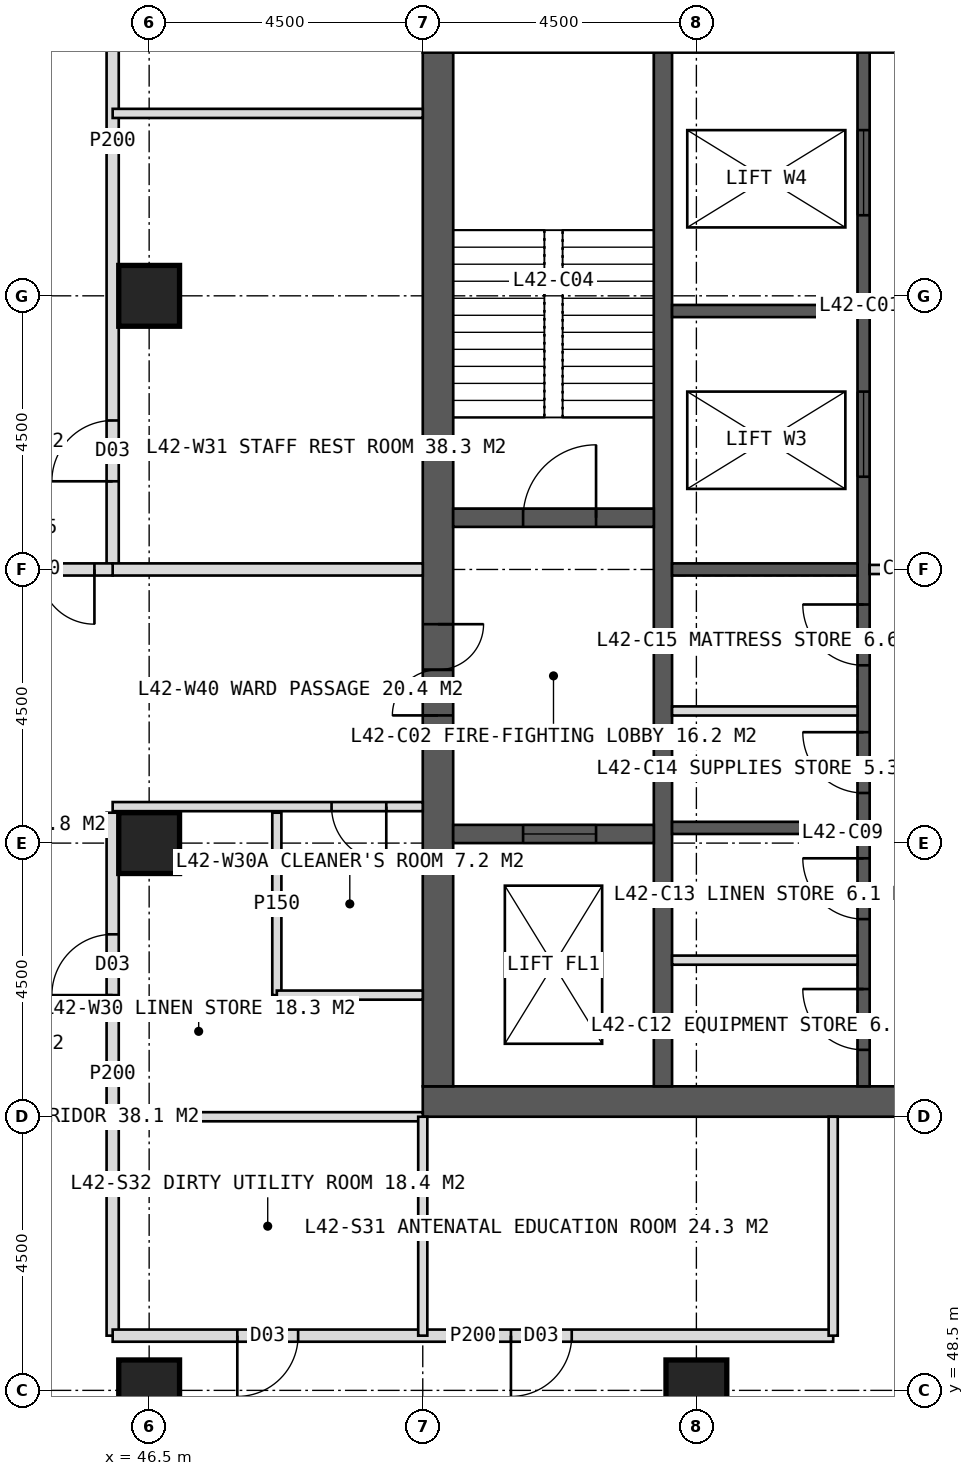
"""IFC4 building model, lengths in metres.
Left out: names, types, materials, properties, quantities, classifications, styles, units other than length and angle.
Written with IfcOpenShell. Run it as: python <this file> out.ifc"""

import sys

from ifc_helpers import new_model, si_unit, direction, frame, frame_2d, origin, origin_2d, place, context, subcontext, project, spatial, rectangle, hollow_rectangle, extrude, element, fill, save


model = new_model("IFC4")
c1 = context("Model", 3, precision=1e-05, world=origin(), true_north=direction((0.0, 1.0)))
c2 = subcontext(c1, "Body", "Model", "MODEL_VIEW")
j1 = project(units=[si_unit("LENGTHUNIT", "METRE"), si_unit("PLANEANGLEUNIT", "RADIAN")], contexts=[c1])
p1 = place(None, origin())
s1 = spatial("IfcSite", under=j1, at=p1, CompositionType="ELEMENT")
p2 = place(p1, origin())
s2 = spatial("IfcBuilding", under=s1, at=p2, CompositionType="ELEMENT")
p3 = place(p2, frame((0.0, 0.0, 177.0)))
s3 = spatial("IfcBuildingStorey", under=s2, at=p3, CompositionType="ELEMENT", Elevation=177.0)
p4 = place(p3, frame((51.0, 53.25, 0.0), z_axis=(0.0, 0.0, 1.0), x_axis=(1.0, 0.0, 0.0)))
e1 = element("IfcWall", 1, at=p4, inside=s3, PredefinedType="SHEAR", context=c2, shape_type="SweptSolid", body=[
    extrude(rectangle(XDim=18.0, YDim=0.5, at=frame_2d((9.0, 0.0))), origin(), (0.0, 0.0, 1.0), 4.0),
])
p5 = place(p4, frame((8.1, 0.0, 0.0)))
e2 = element("IfcOpeningElement", 2, at=p5, cuts=e1, PredefinedType="OPENING", context=c2, shape_type="SweptSolid", body=[
    extrude(rectangle(XDim=1.8, YDim=2.2, at=frame_2d((0.9, 1.1))), frame((0.0, 0.26, 0.0), z_axis=(0.0, -1.0, 0.0), x_axis=(1.0, 0.0, 0.0)), (0.0, 0.0, 1.0), 0.52),
])
p6 = place(p3, frame((51.25, 53.5, 0.0), z_axis=(0.0, 0.0, 1.0), x_axis=(0.0, 1.0, 0.0)))
e3 = element("IfcWall", 3, at=p6, inside=s3, PredefinedType="SHEAR", context=c2, shape_type="SweptSolid", body=[
    extrude(rectangle(XDim=17.0, YDim=0.5, at=frame_2d((8.5, 0.0))), origin(), (0.0, 0.0, 1.0), 4.0),
])
p7 = place(p6, frame((6.1, 0.0, 0.0)))
e4 = element("IfcOpeningElement", 4, at=p7, cuts=e3, PredefinedType="OPENING", context=c2, shape_type="SweptSolid", body=[
    extrude(rectangle(XDim=1.5, YDim=2.2, at=frame_2d((0.75, 1.1))), frame((0.0, 0.26, 0.0), z_axis=(0.0, -1.0, 0.0), x_axis=(1.0, 0.0, 0.0)), (0.0, 0.0, 1.0), 0.52),
])
p8 = place(p3, frame((54.95, 53.5, 0.0), z_axis=(0.0, 0.0, 1.0), x_axis=(0.0, 1.0, 0.0)))
e5 = element("IfcWall", 5, at=p8, inside=s3, PredefinedType="SHEAR", context=c2, shape_type="SweptSolid", body=[
    extrude(rectangle(XDim=17.0, YDim=0.3, at=frame_2d((8.5, 0.0))), origin(), (0.0, 0.0, 1.0), 4.0),
])
p9 = place(p3, frame((58.25, 53.5, 0.0), z_axis=(0.0, 0.0, 1.0), x_axis=(0.0, 1.0, 0.0)))
e6 = element("IfcWall", 6, at=p9, inside=s3, PredefinedType="SHEAR", context=c2, shape_type="SweptSolid", body=[
    extrude(rectangle(XDim=17.0, YDim=0.2, at=frame_2d((8.5, 0.0))), origin(), (0.0, 0.0, 1.0), 4.0),
])
p10 = place(p9, frame((0.6, 0.0, 0.0)))
e7 = element("IfcOpeningElement", 7, at=p10, cuts=e6, PredefinedType="OPENING", context=c2, shape_type="SweptSolid", body=[
    extrude(rectangle(XDim=1.0, YDim=2.1, at=frame_2d((0.5, 1.05))), frame((0.0, 0.11, 0.0), z_axis=(0.0, -1.0, 0.0), x_axis=(1.0, 0.0, 0.0)), (0.0, 0.0, 1.0), 0.22),
])
p11 = place(p9, frame((2.75, 0.0, 0.0)))
e8 = element("IfcOpeningElement", 8, at=p11, cuts=e6, PredefinedType="OPENING", context=c2, shape_type="SweptSolid", body=[
    extrude(rectangle(XDim=1.0, YDim=2.1, at=frame_2d((0.5, 1.05))), frame((0.0, 0.11, 0.0), z_axis=(0.0, -1.0, 0.0), x_axis=(1.0, 0.0, 0.0)), (0.0, 0.0, 1.0), 0.22),
])
p12 = place(p9, frame((4.824, 0.0, 0.0)))
e9 = element("IfcOpeningElement", 9, at=p12, cuts=e6, PredefinedType="OPENING", context=c2, shape_type="SweptSolid", body=[
    extrude(rectangle(XDim=1.0, YDim=2.1, at=frame_2d((0.5, 1.05))), frame((0.0, 0.11, 0.0), z_axis=(0.0, -1.0, 0.0), x_axis=(1.0, 0.0, 0.0)), (0.0, 0.0, 1.0), 0.22),
])
p13 = place(p9, frame((6.924, 0.0, 0.0)))
e10 = element("IfcOpeningElement", 10, at=p13, cuts=e6, PredefinedType="OPENING", context=c2, shape_type="SweptSolid", body=[
    extrude(rectangle(XDim=1.0, YDim=2.1, at=frame_2d((0.5, 1.05))), frame((0.0, 0.11, 0.0), z_axis=(0.0, -1.0, 0.0), x_axis=(1.0, 0.0, 0.0)), (0.0, 0.0, 1.0), 0.22),
])
p14 = place(p9, frame((10.025, 0.0, 0.0)))
e11 = element("IfcOpeningElement", 11, at=p14, cuts=e6, PredefinedType="OPENING", context=c2, shape_type="SweptSolid", body=[
    extrude(rectangle(XDim=1.4, YDim=2.2, at=frame_2d((0.7, 1.1))), frame((0.0, 0.11, 0.0), z_axis=(0.0, -1.0, 0.0), x_axis=(1.0, 0.0, 0.0)), (0.0, 0.0, 1.0), 0.22),
])
p15 = place(p9, frame((14.325, 0.0, 0.0)))
e12 = element("IfcOpeningElement", 12, at=p15, cuts=e6, PredefinedType="OPENING", context=c2, shape_type="SweptSolid", body=[
    extrude(rectangle(XDim=1.4, YDim=2.2, at=frame_2d((0.7, 1.1))), frame((0.0, 0.11, 0.0), z_axis=(0.0, -1.0, 0.0), x_axis=(1.0, 0.0, 0.0)), (0.0, 0.0, 1.0), 0.22),
])
for number, where, z_axis, x_axis in (
    (13, (55.1, 57.75, 0.0), (0.0, 0.0, 1.0), (1.0, 0.0, 0.0)),
    (14, (55.1, 62.0, 0.0), (0.0, 0.0, 1.0), (1.0, 0.0, 0.0)),
    (15, (55.1, 66.25, 0.0), (0.0, 0.0, 1.0), (1.0, 0.0, 0.0)),
):
    element("IfcWall", number, at=place(p3, frame(where, z_axis=z_axis, x_axis=x_axis)), inside=s3, PredefinedType="SHEAR", context=c2, shape_type="SweptSolid", body=[
        extrude(rectangle(XDim=3.05, YDim=0.2, at=frame_2d((1.525, 0.0))), origin(), (0.0, 0.0, 1.0), 4.0),
    ])
p16 = place(p3, frame((51.5, 62.85, 0.0), z_axis=(0.0, 0.0, 1.0), x_axis=(1.0, 0.0, 0.0)))
e16 = element("IfcWall", 16, at=p16, inside=s3, PredefinedType="SHEAR", context=c2, shape_type="SweptSolid", body=[
    extrude(rectangle(XDim=3.3, YDim=0.3, at=frame_2d((1.65, 0.0))), origin(), (0.0, 0.0, 1.0), 4.0),
])
p17 = place(p16, frame((1.15, 0.0, 0.0)))
e17 = element("IfcOpeningElement", 17, at=p17, cuts=e16, PredefinedType="OPENING", context=c2, shape_type="SweptSolid", body=[
    extrude(rectangle(XDim=1.2, YDim=2.1, at=frame_2d((0.6, 1.05))), frame((0.0, 0.16, 0.0), z_axis=(0.0, -1.0, 0.0), x_axis=(1.0, 0.0, 0.0)), (0.0, 0.0, 1.0), 0.32),
])
p18 = place(p3, frame((51.5, 57.65, 0.0), z_axis=(0.0, 0.0, 1.0), x_axis=(1.0, 0.0, 0.0)))
e18 = element("IfcWall", 18, at=p18, inside=s3, PredefinedType="SHEAR", context=c2, shape_type="SweptSolid", body=[
    extrude(rectangle(XDim=3.3, YDim=0.3, at=frame_2d((1.65, 0.0))), origin(), (0.0, 0.0, 1.0), 4.0),
])
p19 = place(p18, frame((1.15, 0.0, 0.0)))
e19 = element("IfcOpeningElement", 19, at=p19, cuts=e18, PredefinedType="OPENING", context=c2, shape_type="SweptSolid", body=[
    extrude(rectangle(XDim=1.2, YDim=2.2, at=frame_2d((0.6, 1.1))), frame((0.0, 0.16, 0.0), z_axis=(0.0, -1.0, 0.0), x_axis=(1.0, 0.0, 0.0)), (0.0, 0.0, 1.0), 0.32),
])
for number, where, z_axis, x_axis in (
    (20, (46.5, 48.5, 0.0), (0.0, 0.0, 1.0), (1.0, 0.0, 0.0)),
    (21, (55.5, 48.5, 0.0), (0.0, 0.0, 1.0), (1.0, 0.0, 0.0)),
    (22, (46.5, 57.5, 0.0), (0.0, 0.0, 1.0), (1.0, 0.0, 0.0)),
    (23, (46.5, 66.5, 0.0), (0.0, 0.0, 1.0), (1.0, 0.0, 0.0)),
):
    element("IfcColumn", number, at=place(p3, frame(where, z_axis=z_axis, x_axis=x_axis)), inside=s3, PredefinedType="COLUMN", context=c2, shape_type="SweptSolid", body=[
        extrude(hollow_rectangle(XDim=1.0, YDim=1.0, WallThickness=0.1, at=origin_2d()), origin(), (0.0, 0.0, 1.0), 4.0),
    ])
p20 = place(p3, frame((51.0, 53.0, 0.0), z_axis=(0.0, 0.0, 1.0), x_axis=(-1.0, 0.0, 0.0)))
e24 = element("IfcWall", 24, at=p20, inside=s3, PredefinedType="PARTITIONING", context=c2, shape_type="SweptSolid", body=[
    extrude(rectangle(XDim=5.1, YDim=0.15, at=frame_2d((2.55, 0.0))), origin(), (0.0, 0.0, 1.0), 3.75),
])
p21 = place(p3, frame((45.9, 49.4, 0.0), z_axis=(0.0, 0.0, 1.0), x_axis=(0.0, 1.0, 0.0)))
e25 = element("IfcWall", 25, at=p21, inside=s3, PredefinedType="PARTITIONING", context=c2, shape_type="SweptSolid", body=[
    extrude(rectangle(XDim=8.6, YDim=0.2, at=frame_2d((4.3, 0.0))), origin(), (0.0, 0.0, 1.0), 3.75),
])
p22 = place(p21, frame((5.6, 0.0, 0.0)))
e26 = element("IfcOpeningElement", 26, at=p22, cuts=e25, PredefinedType="OPENING", context=c2, shape_type="SweptSolid", body=[
    extrude(rectangle(XDim=1.0, YDim=2.1, at=frame_2d((0.5, 1.05))), frame((0.0, 0.11, 0.0), z_axis=(0.0, -1.0, 0.0), x_axis=(1.0, 0.0, 0.0)), (0.0, 0.0, 1.0), 0.22),
])
p23 = place(p3, frame((45.9, 62.0, 0.0), z_axis=(0.0, 0.0, 1.0), x_axis=(0.0, 1.0, 0.0)))
e27 = element("IfcWall", 27, at=p23, inside=s3, PredefinedType="PARTITIONING", context=c2, shape_type="SweptSolid", body=[
    extrude(rectangle(XDim=14.1, YDim=0.2, at=frame_2d((7.05, 0.0))), origin(), (0.0, 0.0, 1.0), 3.75),
])
p24 = place(p23, frame((1.45, 0.0, 0.0)))
e28 = element("IfcOpeningElement", 28, at=p24, cuts=e27, PredefinedType="OPENING", context=c2, shape_type="SweptSolid", body=[
    extrude(rectangle(XDim=1.0, YDim=2.1, at=frame_2d((0.5, 1.05))), frame((0.0, 0.11, 0.0), z_axis=(0.0, -1.0, 0.0), x_axis=(1.0, 0.0, 0.0)), (0.0, 0.0, 1.0), 0.22),
])
p25 = place(p23, frame((10.3, 0.0, 0.0)))
e29 = element("IfcOpeningElement", 29, at=p25, cuts=e27, PredefinedType="OPENING", context=c2, shape_type="SweptSolid", body=[
    extrude(rectangle(XDim=1.0, YDim=2.1, at=frame_2d((0.5, 1.05))), frame((0.0, 0.11, 0.0), z_axis=(0.0, -1.0, 0.0), x_axis=(1.0, 0.0, 0.0)), (0.0, 0.0, 1.0), 0.22),
])
p26 = place(p3, frame((51.0, 58.1, 0.0), z_axis=(0.0, 0.0, 1.0), x_axis=(-1.0, 0.0, 0.0)))
e30 = element("IfcWall", 30, at=p26, inside=s3, PredefinedType="PARTITIONING", context=c2, shape_type="SweptSolid", body=[
    extrude(rectangle(XDim=5.1, YDim=0.15, at=frame_2d((2.55, 0.0))), origin(), (0.0, 0.0, 1.0), 3.75),
])
p27 = place(p26, frame((0.6, 0.0, 0.0)))
e31 = element("IfcOpeningElement", 31, at=p27, cuts=e30, PredefinedType="OPENING", context=c2, shape_type="SweptSolid", body=[
    extrude(rectangle(XDim=0.9, YDim=2.1, at=frame_2d((0.45, 1.05))), frame((0.0, 0.085, 0.0), z_axis=(0.0, -1.0, 0.0), x_axis=(1.0, 0.0, 0.0)), (0.0, 0.0, 1.0), 0.17),
])
p28 = place(p3, frame((51.0, 62.0, 0.0), z_axis=(0.0, 0.0, 1.0), x_axis=(-1.0, 0.0, 0.0)))
e32 = element("IfcWall", 32, at=p28, inside=s3, PredefinedType="SOLIDWALL", context=c2, shape_type="SweptSolid", body=[
    extrude(rectangle(XDim=5.1, YDim=0.2, at=frame_2d((2.55, 0.0))), origin(), (0.0, 0.0, 1.0), 2.95),
])
p29 = place(p3, frame((51.0, 69.5, 0.0), z_axis=(0.0, 0.0, 1.0), x_axis=(-1.0, 0.0, 0.0)))
e33 = element("IfcWall", 33, at=p29, inside=s3, PredefinedType="PARTITIONING", context=c2, shape_type="SweptSolid", body=[
    extrude(rectangle(XDim=5.1, YDim=0.15, at=frame_2d((2.55, 0.0))), origin(), (0.0, 0.0, 1.0), 3.75),
])
p30 = place(p3, frame((48.6, 55.0, 0.0), z_axis=(0.0, 0.0, 1.0), x_axis=(0.0, 1.0, 0.0)))
e34 = element("IfcWall", 34, at=p30, inside=s3, PredefinedType="PARTITIONING", context=c2, shape_type="SweptSolid", body=[
    extrude(rectangle(XDim=3.0, YDim=0.15, at=frame_2d((1.5, 0.0))), origin(), (0.0, 0.0, 1.0), 3.75),
])
p31 = place(p3, frame((51.0, 55.0, 0.0), z_axis=(0.0, 0.0, 1.0), x_axis=(-1.0, 0.0, 0.0)))
e35 = element("IfcWall", 35, at=p31, inside=s3, PredefinedType="PARTITIONING", context=c2, shape_type="SweptSolid", body=[
    extrude(rectangle(XDim=2.4, YDim=0.15, at=frame_2d((1.2, 0.0))), origin(), (0.0, 0.0, 1.0), 3.75),
])
p32 = place(p3, frame((57.75, 49.4, 0.0), z_axis=(0.0, 0.0, 1.0), x_axis=(-1.0, 0.0, 0.0)))
e36 = element("IfcWall", 36, at=p32, inside=s3, PredefinedType="PARTITIONING", context=c2, shape_type="SweptSolid", body=[
    extrude(rectangle(XDim=11.85, YDim=0.2, at=frame_2d((5.925, 0.0))), origin(), (0.0, 0.0, 1.0), 3.75),
])
p33 = place(p32, frame((4.3, 0.0, 0.0)))
e37 = element("IfcOpeningElement", 37, at=p33, cuts=e36, PredefinedType="OPENING", context=c2, shape_type="SweptSolid", body=[
    extrude(rectangle(XDim=1.0, YDim=2.1, at=frame_2d((0.5, 1.05))), frame((0.0, 0.11, 0.0), z_axis=(0.0, -1.0, 0.0), x_axis=(1.0, 0.0, 0.0)), (0.0, 0.0, 1.0), 0.22),
])
p34 = place(p32, frame((8.8, 0.0, 0.0)))
e38 = element("IfcOpeningElement", 38, at=p34, cuts=e36, PredefinedType="OPENING", context=c2, shape_type="SweptSolid", body=[
    extrude(rectangle(XDim=1.0, YDim=2.1, at=frame_2d((0.5, 1.05))), frame((0.0, 0.11, 0.0), z_axis=(0.0, -1.0, 0.0), x_axis=(1.0, 0.0, 0.0)), (0.0, 0.0, 1.0), 0.22),
])
for number, where, z_axis, x_axis in (
    (39, (57.75, 53.0, 0.0), (0.0, 0.0, 1.0), (0.0, -1.0, 0.0)),
    (40, (51.0, 53.0, 0.0), (0.0, 0.0, 1.0), (0.0, -1.0, 0.0)),
):
    element("IfcWall", number, at=place(p3, frame(where, z_axis=z_axis, x_axis=x_axis)), inside=s3, PredefinedType="PARTITIONING", context=c2, shape_type="SweptSolid", body=[
        extrude(rectangle(XDim=3.6, YDim=0.15, at=frame_2d((1.8, 0.0))), origin(), (0.0, 0.0, 1.0), 3.75),
    ])
p35 = place(p3, frame((45.9, 62.0, 0.0), z_axis=(0.0, 0.0, 1.0), x_axis=(-1.0, 0.0, 0.0)))
e41 = element("IfcWall", 41, at=p35, inside=s3, PredefinedType="SOLIDWALL", context=c2, shape_type="SweptSolid", body=[
    extrude(rectangle(XDim=2.7, YDim=0.2, at=frame_2d((1.35, 0.0))), origin(), (0.0, 0.0, 1.0), 2.95),
])
p36 = place(p35, frame((0.3, 0.0, 0.0)))
e42 = element("IfcOpeningElement", 42, at=p36, cuts=e41, PredefinedType="OPENING", context=c2, shape_type="SweptSolid", body=[
    extrude(rectangle(XDim=1.8, YDim=2.2, at=frame_2d((0.9, 1.1))), frame((0.0, 0.11, 0.0), z_axis=(0.0, -1.0, 0.0), x_axis=(1.0, 0.0, 0.0)), (0.0, 0.0, 1.0), 0.22),
])
for number, where, z_axis, x_axis in (
    (43, (55.1, 55.575, 0.0), (0.0, 0.0, 1.0), (1.0, 0.0, 0.0)),
    (44, (55.1, 59.673, 0.0), (0.0, 0.0, 1.0), (1.0, 0.0, 0.0)),
):
    element("IfcWall", number, at=place(p3, frame(where, z_axis=z_axis, x_axis=x_axis)), inside=s3, PredefinedType="PARTITIONING", context=c2, shape_type="SweptSolid", body=[
        extrude(rectangle(XDim=3.05, YDim=0.15, at=frame_2d((1.525, 0.0))), origin(), (0.0, 0.0, 1.0), 3.75),
    ])
p37 = place(p3, frame((58.35, 62.0, 0.0), z_axis=(0.0, 0.0, 1.0), x_axis=(1.0, 0.0, 0.0)))
e45 = element("IfcWall", 45, at=p37, inside=s3, PredefinedType="PARTITIONING", context=c2, shape_type="SweptSolid", body=[
    extrude(rectangle(XDim=3.3, YDim=0.15, at=frame_2d((1.65, 0.0))), origin(), (0.0, 0.0, 1.0), 3.75),
])
p38 = place(p27, origin())
e46 = element("IfcDoor", 46, at=p38, inside=s3, OperationType="SINGLE_SWING_LEFT", PredefinedType="DOOR", context=c2, shape_type="SweptSolid", body=[
    extrude(rectangle(XDim=0.9, YDim=2.1, at=frame_2d((0.45, 1.05))), frame((0.0, 0.025, 0.0), z_axis=(0.0, -1.0, 0.0), x_axis=(1.0, 0.0, 0.0)), (0.0, 0.0, 1.0), 0.05),
])
fill(e31, e46)
p39 = place(p22, origin())
e47 = element("IfcDoor", 47, at=p39, inside=s3, OperationType="SINGLE_SWING_LEFT", PredefinedType="DOOR", context=c2, shape_type="SweptSolid", body=[
    extrude(rectangle(XDim=1.0, YDim=2.1, at=frame_2d((0.5, 1.05))), frame((0.0, 0.025, 0.0), z_axis=(0.0, -1.0, 0.0), x_axis=(1.0, 0.0, 0.0)), (0.0, 0.0, 1.0), 0.05),
])
fill(e26, e47)
p40 = place(p24, origin())
e48 = element("IfcDoor", 48, at=p40, inside=s3, OperationType="SINGLE_SWING_LEFT", PredefinedType="DOOR", context=c2, shape_type="SweptSolid", body=[
    extrude(rectangle(XDim=1.0, YDim=2.1, at=frame_2d((0.5, 1.05))), frame((0.0, 0.025, 0.0), z_axis=(0.0, -1.0, 0.0), x_axis=(1.0, 0.0, 0.0)), (0.0, 0.0, 1.0), 0.05),
])
fill(e28, e48)
p41 = place(p33, origin())
e49 = element("IfcDoor", 49, at=p41, inside=s3, OperationType="SINGLE_SWING_RIGHT", PredefinedType="DOOR", context=c2, shape_type="SweptSolid", body=[
    extrude(rectangle(XDim=1.0, YDim=2.1, at=frame_2d((0.5, 1.05))), frame((0.0, 0.025, 0.0), z_axis=(0.0, -1.0, 0.0), x_axis=(1.0, 0.0, 0.0)), (0.0, 0.0, 1.0), 0.05),
])
fill(e37, e49)
p42 = place(p34, origin())
e50 = element("IfcDoor", 50, at=p42, inside=s3, OperationType="SINGLE_SWING_RIGHT", PredefinedType="DOOR", context=c2, shape_type="SweptSolid", body=[
    extrude(rectangle(XDim=1.0, YDim=2.1, at=frame_2d((0.5, 1.05))), frame((0.0, 0.025, 0.0), z_axis=(0.0, -1.0, 0.0), x_axis=(1.0, 0.0, 0.0)), (0.0, 0.0, 1.0), 0.05),
])
fill(e38, e50)
p43 = place(p36, origin())
e51 = element("IfcDoor", 51, at=p43, inside=s3, OperationType="DOUBLE_DOOR_DOUBLE_SWING", PredefinedType="DOOR", context=c2, shape_type="SweptSolid", body=[
    extrude(rectangle(XDim=1.8, YDim=2.2, at=frame_2d((0.9, 1.1))), frame((0.0, 0.025, 0.0), z_axis=(0.0, -1.0, 0.0), x_axis=(1.0, 0.0, 0.0)), (0.0, 0.0, 1.0), 0.05),
])
fill(e42, e51)
p44 = place(p7, origin())
e52 = element("IfcDoor", 52, at=p44, inside=s3, OperationType="DOUBLE_DOOR_SINGLE_SWING", PredefinedType="DOOR", context=c2, shape_type="SweptSolid", body=[
    extrude(rectangle(XDim=1.5, YDim=2.2, at=frame_2d((0.75, 1.1))), frame((0.0, 0.025, 0.0), z_axis=(0.0, -1.0, 0.0), x_axis=(1.0, 0.0, 0.0)), (0.0, 0.0, 1.0), 0.05),
])
fill(e4, e52)
p45 = place(p17, origin())
e53 = element("IfcDoor", 53, at=p45, inside=s3, OperationType="SINGLE_SWING_RIGHT", PredefinedType="DOOR", context=c2, shape_type="SweptSolid", body=[
    extrude(rectangle(XDim=1.2, YDim=2.1, at=frame_2d((0.6, 1.05))), frame((0.0, 0.025, 0.0), z_axis=(0.0, -1.0, 0.0), x_axis=(1.0, 0.0, 0.0)), (0.0, 0.0, 1.0), 0.05),
])
fill(e17, e53)
p46 = place(p19, origin())
e54 = element("IfcDoor", 54, at=p46, inside=s3, OperationType="SLIDING_TO_LEFT", PredefinedType="DOOR", context=c2, shape_type="SweptSolid", body=[
    extrude(rectangle(XDim=1.2, YDim=2.2, at=frame_2d((0.6, 1.1))), frame((0.0, 0.025, 0.0), z_axis=(0.0, -1.0, 0.0), x_axis=(1.0, 0.0, 0.0)), (0.0, 0.0, 1.0), 0.05),
])
fill(e19, e54)
p47 = place(p10, origin())
e55 = element("IfcDoor", 55, at=p47, inside=s3, OperationType="SINGLE_SWING_RIGHT", PredefinedType="DOOR", context=c2, shape_type="SweptSolid", body=[
    extrude(rectangle(XDim=1.0, YDim=2.1, at=frame_2d((0.5, 1.05))), frame((0.0, 0.025, 0.0), z_axis=(0.0, -1.0, 0.0), x_axis=(1.0, 0.0, 0.0)), (0.0, 0.0, 1.0), 0.05),
])
fill(e7, e55)
p48 = place(p11, origin())
e56 = element("IfcDoor", 56, at=p48, inside=s3, OperationType="SINGLE_SWING_RIGHT", PredefinedType="DOOR", context=c2, shape_type="SweptSolid", body=[
    extrude(rectangle(XDim=1.0, YDim=2.1, at=frame_2d((0.5, 1.05))), frame((0.0, 0.025, 0.0), z_axis=(0.0, -1.0, 0.0), x_axis=(1.0, 0.0, 0.0)), (0.0, 0.0, 1.0), 0.05),
])
fill(e8, e56)
p49 = place(p12, origin())
e57 = element("IfcDoor", 57, at=p49, inside=s3, OperationType="SINGLE_SWING_RIGHT", PredefinedType="DOOR", context=c2, shape_type="SweptSolid", body=[
    extrude(rectangle(XDim=1.0, YDim=2.1, at=frame_2d((0.5, 1.05))), frame((0.0, 0.025, 0.0), z_axis=(0.0, -1.0, 0.0), x_axis=(1.0, 0.0, 0.0)), (0.0, 0.0, 1.0), 0.05),
])
fill(e9, e57)
p50 = place(p13, origin())
e58 = element("IfcDoor", 58, at=p50, inside=s3, OperationType="SINGLE_SWING_RIGHT", PredefinedType="DOOR", context=c2, shape_type="SweptSolid", body=[
    extrude(rectangle(XDim=1.0, YDim=2.1, at=frame_2d((0.5, 1.05))), frame((0.0, 0.025, 0.0), z_axis=(0.0, -1.0, 0.0), x_axis=(1.0, 0.0, 0.0)), (0.0, 0.0, 1.0), 0.05),
])
fill(e10, e58)
p51 = place(p14, origin())
e59 = element("IfcDoor", 59, at=p51, inside=s3, OperationType="SLIDING_TO_LEFT", PredefinedType="DOOR", context=c2, shape_type="SweptSolid", body=[
    extrude(rectangle(XDim=1.4, YDim=2.2, at=frame_2d((0.7, 1.1))), frame((0.0, 0.025, 0.0), z_axis=(0.0, -1.0, 0.0), x_axis=(1.0, 0.0, 0.0)), (0.0, 0.0, 1.0), 0.05),
])
fill(e11, e59)
p52 = place(p15, origin())
e60 = element("IfcDoor", 60, at=p52, inside=s3, OperationType="SLIDING_TO_LEFT", PredefinedType="DOOR", context=c2, shape_type="SweptSolid", body=[
    extrude(rectangle(XDim=1.4, YDim=2.2, at=frame_2d((0.7, 1.1))), frame((0.0, 0.025, 0.0), z_axis=(0.0, -1.0, 0.0), x_axis=(1.0, 0.0, 0.0)), (0.0, 0.0, 1.0), 0.05),
])
fill(e12, e60)
save(model, sys.argv[1])
